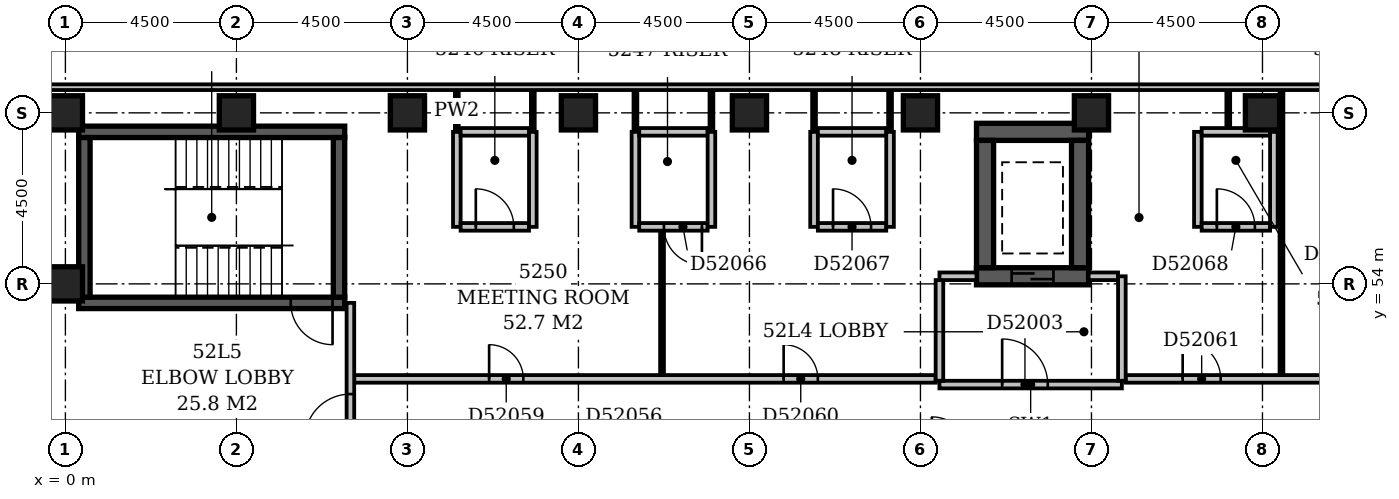
"""IFC4 building model, lengths in metres.
Left out: names, types, materials, properties, quantities, classifications, styles, units other than length and angle.
Written with IfcOpenShell. Run it as: python <this file> out.ifc"""

import sys

from ifc_helpers import new_model, si_unit, direction, frame, frame_2d, origin, origin_2d, place, context, subcontext, project, spatial, rectangle, extrude, element, fill, save


model = new_model("IFC4")
c1 = context("Model", 3, precision=1e-05, world=origin(), true_north=direction((0.0, 1.0)))
c2 = subcontext(c1, "Body", "Model", "MODEL_VIEW")
j1 = project(units=[si_unit("LENGTHUNIT", "METRE"), si_unit("PLANEANGLEUNIT", "RADIAN")], contexts=[c1])
p1 = place(None, origin())
s1 = spatial("IfcSite", under=j1, at=p1, CompositionType="ELEMENT")
p2 = place(p1, origin())
s2 = spatial("IfcBuilding", under=s1, at=p2, CompositionType="ELEMENT")
p3 = place(p2, frame((0.0, 0.0, 204.2)))
s3 = spatial("IfcBuildingStorey", under=s2, at=p3, CompositionType="ELEMENT", Elevation=204.2)
p4 = place(p3, frame((0.35, 53.5, -0.3), z_axis=(0.0, 0.0, 1.0), x_axis=(1.0, 0.0, 0.0)))
e1 = element("IfcWall", 1, at=p4, inside=s3, PredefinedType="SHEAR", context=c2, shape_type="SweptSolid", body=[
    extrude(rectangle(XDim=7.0, YDim=0.3, at=frame_2d((3.5, 0.0))), origin(), (0.0, 0.0, 1.0), 3.6),
])
p5 = place(p4, frame((5.58, 0.0, 0.3)))
e2 = element("IfcOpeningElement", 2, at=p5, cuts=e1, PredefinedType="OPENING", context=c2, shape_type="SweptSolid", body=[
    extrude(rectangle(XDim=1.1, YDim=2.1, at=frame_2d((0.55, 1.05))), frame((0.0, 0.162, 0.0), z_axis=(0.0, -1.0, 0.0), x_axis=(1.0, 0.0, 0.0)), (0.0, 0.0, 1.0), 0.324),
])
p6 = place(p3, frame((0.35, 58.0, -0.3), z_axis=(0.0, 0.0, 1.0), x_axis=(1.0, 0.0, 0.0)))
e3 = element("IfcWall", 3, at=p6, inside=s3, PredefinedType="SHEAR", context=c2, shape_type="SweptSolid", body=[
    extrude(rectangle(XDim=7.0, YDim=0.3, at=frame_2d((3.5, 0.0))), origin(), (0.0, 0.0, 1.0), 3.6),
])
for number, where, z_axis, x_axis in (
    (4, (0.5, 53.65, -0.3), (0.0, 0.0, 1.0), (0.0, 1.0, 0.0)),
    (5, (7.2, 53.65, -0.3), (0.0, 0.0, 1.0), (0.0, 1.0, 0.0)),
):
    element("IfcWall", number, at=place(p3, frame(where, z_axis=z_axis, x_axis=x_axis)), inside=s3, PredefinedType="SHEAR", context=c2, shape_type="SweptSolid", body=[
        extrude(rectangle(XDim=4.2, YDim=0.3, at=frame_2d((2.1, 0.0))), origin(), (0.0, 0.0, 1.0), 3.6),
    ])
p7 = place(p3, frame((23.975, 54.2, -0.3), z_axis=(0.0, 0.0, 1.0), x_axis=(1.0, 0.0, 0.0)))
e6 = element("IfcWall", 6, at=p7, inside=s3, PredefinedType="SHEAR", context=c2, shape_type="SweptSolid", body=[
    extrude(rectangle(XDim=2.95, YDim=0.45, at=frame_2d((1.475, 0.0))), origin(), (0.0, 0.0, 1.0), 3.6),
])
p8 = place(p7, frame((0.925, 0.0, 0.3)))
e7 = element("IfcOpeningElement", 7, at=p8, cuts=e6, PredefinedType="OPENING", context=c2, shape_type="SweptSolid", body=[
    extrude(rectangle(XDim=1.1, YDim=2.1, at=frame_2d((0.55, 1.05))), frame((0.0, 0.237, 0.0), z_axis=(0.0, -1.0, 0.0), x_axis=(1.0, 0.0, 0.0)), (0.0, 0.0, 1.0), 0.474),
])
p9 = place(p3, frame((23.975, 58.0, -0.3), z_axis=(0.0, 0.0, 1.0), x_axis=(1.0, 0.0, 0.0)))
e8 = element("IfcWall", 8, at=p9, inside=s3, PredefinedType="SHEAR", context=c2, shape_type="SweptSolid", body=[
    extrude(rectangle(XDim=2.95, YDim=0.45, at=frame_2d((1.475, 0.0))), origin(), (0.0, 0.0, 1.0), 3.6),
])
for number, where, z_axis, x_axis in (
    (9, (24.2, 54.425, -0.3), (0.0, 0.0, 1.0), (0.0, 1.0, 0.0)),
    (10, (26.7, 54.425, -0.3), (0.0, 0.0, 1.0), (0.0, 1.0, 0.0)),
):
    element("IfcWall", number, at=place(p3, frame(where, z_axis=z_axis, x_axis=x_axis)), inside=s3, PredefinedType="SHEAR", context=c2, shape_type="SweptSolid", body=[
        extrude(rectangle(XDim=3.35, YDim=0.45, at=frame_2d((1.675, 0.0))), origin(), (0.0, 0.0, 1.0), 3.6),
    ])
for number, where, z_axis, x_axis in (
    (11, (0.0, 54.0, -0.3), (0.0, 0.0, 1.0), (1.0, 0.0, 0.0)),
    (12, (0.0, 58.5, -0.3), (0.0, 0.0, 1.0), (1.0, 0.0, 0.0)),
    (13, (4.5, 58.5, -0.3), (0.0, 0.0, 1.0), (1.0, 0.0, 0.0)),
    (14, (9.0, 58.5, -0.3), (0.0, 0.0, 1.0), (1.0, 0.0, 0.0)),
    (15, (13.5, 58.5, -0.3), (0.0, 0.0, 1.0), (1.0, 0.0, 0.0)),
    (16, (18.0, 58.5, -0.3), (0.0, 0.0, 1.0), (1.0, 0.0, 0.0)),
    (17, (22.5, 58.5, -0.3), (0.0, 0.0, 1.0), (1.0, 0.0, 0.0)),
    (18, (27.0, 58.5, -0.3), (0.0, 0.0, 1.0), (1.0, 0.0, 0.0)),
    (19, (31.5, 58.5, -0.3), (0.0, 0.0, 1.0), (1.0, 0.0, 0.0)),
):
    element("IfcColumn", number, at=place(p3, frame(where, z_axis=z_axis, x_axis=x_axis)), inside=s3, PredefinedType="COLUMN", context=c2, shape_type="SweptSolid", body=[
        extrude(rectangle(XDim=0.9, YDim=0.9, at=origin_2d()), origin(), (0.0, 0.0, 1.0), 3.6),
    ])
p10 = place(p3, frame((50.1, 59.175, 0.0), z_axis=(0.0, 0.0, 1.0), x_axis=(-1.0, 0.0, 0.0)))
e20 = element("IfcWall", 20, at=p10, inside=s3, PredefinedType="STANDARD", context=c2, shape_type="SweptSolid", body=[
    extrude(rectangle(XDim=50.85, YDim=0.15, at=frame_2d((25.425, 0.0))), origin(), (0.0, 0.0, 1.0), 2.7),
])
p11 = place(p3, frame((23.0, 51.35, 0.0), z_axis=(0.0, 0.0, 1.0), x_axis=(1.0, 0.0, 0.0)))
e21 = element("IfcWall", 21, at=p11, inside=s3, PredefinedType="PARTITIONING", context=c2, shape_type="SweptSolid", body=[
    extrude(rectangle(XDim=4.8, YDim=0.2, at=frame_2d((2.4, 0.0))), origin(), (0.0, 0.0, 1.0), 3.3),
])
p12 = place(p11, frame((1.65, 0.0, 0.0)))
e22 = element("IfcOpeningElement", 22, at=p12, cuts=e21, PredefinedType="OPENING", context=c2, shape_type="SweptSolid", body=[
    extrude(rectangle(XDim=1.2, YDim=2.1, at=frame_2d((0.6, 1.05))), frame((0.0, 0.112, 0.0), z_axis=(0.0, -1.0, 0.0), x_axis=(1.0, 0.0, 0.0)), (0.0, 0.0, 1.0), 0.224),
])
p13 = place(p3, frame((27.8, 51.45, 0.0), z_axis=(0.0, 0.0, 1.0), x_axis=(0.0, 1.0, 0.0)))
e23 = element("IfcWall", 23, at=p13, inside=s3, PredefinedType="PARTITIONING", context=c2, shape_type="SweptSolid", body=[
    extrude(rectangle(XDim=2.75, YDim=0.2, at=frame_2d((1.375, 0.0))), origin(), (0.0, 0.0, 1.0), 3.3),
])
p14 = place(p3, frame((23.0, 54.2, 0.0), z_axis=(0.0, 0.0, 1.0), x_axis=(1.0, 0.0, 0.0)))
e24 = element("IfcWall", 24, at=p14, inside=s3, PredefinedType="PARTITIONING", context=c2, shape_type="SweptSolid", body=[
    extrude(rectangle(XDim=0.975, YDim=0.2, at=frame_2d((0.488, 0.0))), origin(), (0.0, 0.0, 1.0), 3.3),
])
p15 = place(p3, frame((26.925, 54.2, 0.0), z_axis=(0.0, 0.0, 1.0), x_axis=(1.0, 0.0, 0.0)))
e25 = element("IfcWall", 25, at=p15, inside=s3, PredefinedType="PARTITIONING", context=c2, shape_type="SweptSolid", body=[
    extrude(rectangle(XDim=0.775, YDim=0.2, at=frame_2d((0.387, 0.0))), origin(), (0.0, 0.0, 1.0), 3.3),
])
p16 = place(p3, frame((23.0, 51.45, 0.0), z_axis=(0.0, 0.0, 1.0), x_axis=(0.0, 1.0, 0.0)))
e26 = element("IfcWall", 26, at=p16, inside=s3, PredefinedType="PARTITIONING", context=c2, shape_type="SweptSolid", body=[
    extrude(rectangle(XDim=2.65, YDim=0.2, at=frame_2d((1.325, 0.0))), origin(), (0.0, 0.0, 1.0), 3.3),
])
p17 = place(p3, frame((7.5, 49.6, 0.0), z_axis=(0.0, 0.0, 1.0), x_axis=(0.0, 1.0, 0.0)))
e27 = element("IfcWall", 27, at=p17, inside=s3, PredefinedType="PARTITIONING", context=c2, shape_type="SweptSolid", body=[
    extrude(rectangle(XDim=3.9, YDim=0.2, at=frame_2d((1.95, 0.0))), origin(), (0.0, 0.0, 1.0), 3.3),
])
p18 = place(p17, frame((0.3, 0.0, 0.0)))
e28 = element("IfcOpeningElement", 28, at=p18, cuts=e27, PredefinedType="OPENING", context=c2, shape_type="SweptSolid", body=[
    extrude(rectangle(XDim=1.2, YDim=2.1, at=frame_2d((0.6, 1.05))), frame((0.0, 0.112, 0.0), z_axis=(0.0, -1.0, 0.0), x_axis=(1.0, 0.0, 0.0)), (0.0, 0.0, 1.0), 0.224),
])
p19 = place(p3, frame((7.6, 51.5, 0.0), z_axis=(0.0, 0.0, 1.0), x_axis=(1.0, 0.0, 0.0)))
e29 = element("IfcWall", 29, at=p19, inside=s3, PredefinedType="PARTITIONING", context=c2, shape_type="SweptSolid", body=[
    extrude(rectangle(XDim=15.3, YDim=0.2, at=frame_2d((7.65, 0.0))), origin(), (0.0, 0.0, 1.0), 3.3),
])
p20 = place(p19, frame((3.55, 0.0, 0.0)))
e30 = element("IfcOpeningElement", 30, at=p20, cuts=e29, PredefinedType="OPENING", context=c2, shape_type="SweptSolid", body=[
    extrude(rectangle(XDim=0.9, YDim=2.1, at=frame_2d((0.45, 1.05))), frame((0.0, 0.112, 0.0), z_axis=(0.0, -1.0, 0.0), x_axis=(1.0, 0.0, 0.0)), (0.0, 0.0, 1.0), 0.224),
])
p21 = place(p19, frame((11.3, 0.0, 0.0)))
e31 = element("IfcOpeningElement", 31, at=p21, cuts=e29, PredefinedType="OPENING", context=c2, shape_type="SweptSolid", body=[
    extrude(rectangle(XDim=0.9, YDim=2.1, at=frame_2d((0.45, 1.05))), frame((0.0, 0.112, 0.0), z_axis=(0.0, -1.0, 0.0), x_axis=(1.0, 0.0, 0.0)), (0.0, 0.0, 1.0), 0.224),
])
p22 = place(p3, frame((27.9, 51.5, 0.0), z_axis=(0.0, 0.0, 1.0), x_axis=(1.0, 0.0, 0.0)))
e32 = element("IfcWall", 32, at=p22, inside=s3, PredefinedType="PARTITIONING", context=c2, shape_type="SweptSolid", body=[
    extrude(rectangle(XDim=9.3, YDim=0.2, at=frame_2d((4.65, 0.0))), origin(), (0.0, 0.0, 1.0), 3.3),
])
p23 = place(p22, frame((1.5, 0.0, 0.0)))
e33 = element("IfcOpeningElement", 33, at=p23, cuts=e32, PredefinedType="OPENING", context=c2, shape_type="SweptSolid", body=[
    extrude(rectangle(XDim=1.0, YDim=2.1, at=frame_2d((0.5, 1.05))), frame((0.0, 0.112, 0.0), z_axis=(0.0, -1.0, 0.0), x_axis=(1.0, 0.0, 0.0)), (0.0, 0.0, 1.0), 0.224),
])
p24 = place(p22, frame((6.3, 0.0, 0.0)))
e34 = element("IfcOpeningElement", 34, at=p24, cuts=e32, PredefinedType="OPENING", context=c2, shape_type="SweptSolid", body=[
    extrude(rectangle(XDim=0.9, YDim=2.1, at=frame_2d((0.45, 1.05))), frame((0.0, 0.112, 0.0), z_axis=(0.0, -1.0, 0.0), x_axis=(1.0, 0.0, 0.0)), (0.0, 0.0, 1.0), 0.224),
])
p25 = place(p3, frame((15.7, 51.6, 0.0), z_axis=(0.0, 0.0, 1.0), x_axis=(0.0, 1.0, 0.0)))
e35 = element("IfcWall", 35, at=p25, inside=s3, PredefinedType="PARTITIONING", context=c2, shape_type="SweptSolid", body=[
    extrude(rectangle(XDim=3.8, YDim=0.1, at=frame_2d((1.9, 0.0))), origin(), (0.0, 0.0, 1.0), 3.3),
])
p26 = place(p3, frame((32.0, 51.6, 0.0), z_axis=(0.0, 0.0, 1.0), x_axis=(0.0, 1.0, 0.0)))
e36 = element("IfcWall", 36, at=p26, inside=s3, PredefinedType="PARTITIONING", context=c2, shape_type="SweptSolid", body=[
    extrude(rectangle(XDim=7.5, YDim=0.1, at=frame_2d((3.75, 0.0))), origin(), (0.0, 0.0, 1.0), 3.3),
])
p27 = place(p3, frame((10.3, 55.5, 0.0), z_axis=(0.0, 0.0, 1.0), x_axis=(0.0, 1.0, 0.0)))
e37 = element("IfcWall", 37, at=p27, inside=s3, PredefinedType="PARTITIONING", context=c2, shape_type="SweptSolid", body=[
    extrude(rectangle(XDim=2.5, YDim=0.2, at=frame_2d((1.25, 0.0))), origin(), (0.0, 0.0, 1.0), 3.3),
])
p28 = place(p3, frame((10.4, 55.5, 0.0), z_axis=(0.0, 0.0, 1.0), x_axis=(1.0, 0.0, 0.0)))
e38 = element("IfcWall", 38, at=p28, inside=s3, PredefinedType="PARTITIONING", context=c2, shape_type="SweptSolid", body=[
    extrude(rectangle(XDim=1.8, YDim=0.2, at=frame_2d((0.9, 0.0))), origin(), (0.0, 0.0, 1.0), 3.3),
])
p29 = place(p28, frame((0.4, 0.0, 0.0)))
e39 = element("IfcOpeningElement", 39, at=p29, cuts=e38, PredefinedType="OPENING", context=c2, shape_type="SweptSolid", body=[
    extrude(rectangle(XDim=1.0, YDim=2.1, at=frame_2d((0.5, 1.05))), frame((0.0, 0.112, 0.0), z_axis=(0.0, -1.0, 0.0), x_axis=(1.0, 0.0, 0.0)), (0.0, 0.0, 1.0), 0.224),
])
for number, where, z_axis, x_axis in (
    (40, (12.3, 55.5, 0.0), (0.0, 0.0, 1.0), (0.0, 1.0, 0.0)),
    (41, (15.0, 55.5, 0.0), (0.0, 0.0, 1.0), (0.0, 1.0, 0.0)),
):
    element("IfcWall", number, at=place(p3, frame(where, z_axis=z_axis, x_axis=x_axis)), inside=s3, PredefinedType="PARTITIONING", context=c2, shape_type="SweptSolid", body=[
        extrude(rectangle(XDim=2.5, YDim=0.2, at=frame_2d((1.25, 0.0))), origin(), (0.0, 0.0, 1.0), 3.3),
    ])
p30 = place(p3, frame((15.1, 55.5, 0.0), z_axis=(0.0, 0.0, 1.0), x_axis=(1.0, 0.0, 0.0)))
e42 = element("IfcWall", 42, at=p30, inside=s3, PredefinedType="PARTITIONING", context=c2, shape_type="SweptSolid", body=[
    extrude(rectangle(XDim=1.8, YDim=0.2, at=frame_2d((0.9, 0.0))), origin(), (0.0, 0.0, 1.0), 3.3),
])
p31 = place(p30, frame((0.65, 0.0, 0.0)))
e43 = element("IfcOpeningElement", 43, at=p31, cuts=e42, PredefinedType="OPENING", context=c2, shape_type="SweptSolid", body=[
    extrude(rectangle(XDim=1.0, YDim=2.1, at=frame_2d((0.5, 1.05))), frame((0.0, 0.112, 0.0), z_axis=(0.0, -1.0, 0.0), x_axis=(1.0, 0.0, 0.0)), (0.0, 0.0, 1.0), 0.224),
])
for number, where, z_axis, x_axis in (
    (44, (17.0, 55.5, 0.0), (0.0, 0.0, 1.0), (0.0, 1.0, 0.0)),
    (45, (19.7, 55.5, 0.0), (0.0, 0.0, 1.0), (0.0, 1.0, 0.0)),
):
    element("IfcWall", number, at=place(p3, frame(where, z_axis=z_axis, x_axis=x_axis)), inside=s3, PredefinedType="PARTITIONING", context=c2, shape_type="SweptSolid", body=[
        extrude(rectangle(XDim=2.5, YDim=0.2, at=frame_2d((1.25, 0.0))), origin(), (0.0, 0.0, 1.0), 3.3),
    ])
p32 = place(p3, frame((19.8, 55.5, 0.0), z_axis=(0.0, 0.0, 1.0), x_axis=(1.0, 0.0, 0.0)))
e46 = element("IfcWall", 46, at=p32, inside=s3, PredefinedType="PARTITIONING", context=c2, shape_type="SweptSolid", body=[
    extrude(rectangle(XDim=1.8, YDim=0.2, at=frame_2d((0.9, 0.0))), origin(), (0.0, 0.0, 1.0), 3.3),
])
p33 = place(p32, frame((0.4, 0.0, 0.0)))
e47 = element("IfcOpeningElement", 47, at=p33, cuts=e46, PredefinedType="OPENING", context=c2, shape_type="SweptSolid", body=[
    extrude(rectangle(XDim=1.0, YDim=2.1, at=frame_2d((0.5, 1.05))), frame((0.0, 0.112, 0.0), z_axis=(0.0, -1.0, 0.0), x_axis=(1.0, 0.0, 0.0)), (0.0, 0.0, 1.0), 0.224),
])
for number, where, z_axis, x_axis in (
    (48, (21.7, 55.5, 0.0), (0.0, 0.0, 1.0), (0.0, 1.0, 0.0)),
    (49, (29.8, 55.5, 0.0), (0.0, 0.0, 1.0), (0.0, 1.0, 0.0)),
):
    element("IfcWall", number, at=place(p3, frame(where, z_axis=z_axis, x_axis=x_axis)), inside=s3, PredefinedType="PARTITIONING", context=c2, shape_type="SweptSolid", body=[
        extrude(rectangle(XDim=2.5, YDim=0.2, at=frame_2d((1.25, 0.0))), origin(), (0.0, 0.0, 1.0), 3.3),
    ])
p34 = place(p3, frame((29.9, 55.5, 0.0), z_axis=(0.0, 0.0, 1.0), x_axis=(1.0, 0.0, 0.0)))
e50 = element("IfcWall", 50, at=p34, inside=s3, PredefinedType="PARTITIONING", context=c2, shape_type="SweptSolid", body=[
    extrude(rectangle(XDim=1.8, YDim=0.2, at=frame_2d((0.9, 0.0))), origin(), (0.0, 0.0, 1.0), 3.3),
])
p35 = place(p34, frame((0.4, 0.0, 0.0)))
e51 = element("IfcOpeningElement", 51, at=p35, cuts=e50, PredefinedType="OPENING", context=c2, shape_type="SweptSolid", body=[
    extrude(rectangle(XDim=1.0, YDim=2.1, at=frame_2d((0.5, 1.05))), frame((0.0, 0.112, 0.0), z_axis=(0.0, -1.0, 0.0), x_axis=(1.0, 0.0, 0.0)), (0.0, 0.0, 1.0), 0.224),
])
p36 = place(p3, frame((31.8, 55.5, 0.0), z_axis=(0.0, 0.0, 1.0), x_axis=(0.0, 1.0, 0.0)))
e52 = element("IfcWall", 52, at=p36, inside=s3, PredefinedType="PARTITIONING", context=c2, shape_type="SweptSolid", body=[
    extrude(rectangle(XDim=2.5, YDim=0.2, at=frame_2d((1.25, 0.0))), origin(), (0.0, 0.0, 1.0), 3.3),
])
p37 = place(p3, frame((10.3, 58.0, 0.0), z_axis=(0.0, 0.0, 1.0), x_axis=(0.0, 1.0, 0.0)))
e53 = element("IfcWall", 53, at=p37, inside=s3, PredefinedType="PARTITIONING", context=c2, shape_type="SweptSolid", body=[
    extrude(rectangle(XDim=1.1, YDim=0.1, at=frame_2d((0.55, 0.0))), origin(), (0.0, 0.0, 1.0), 3.3),
])
p38 = place(p3, frame((10.4, 58.0, 0.0), z_axis=(0.0, 0.0, 1.0), x_axis=(1.0, 0.0, 0.0)))
e54 = element("IfcWall", 54, at=p38, inside=s3, PredefinedType="PARTITIONING", context=c2, shape_type="SweptSolid", body=[
    extrude(rectangle(XDim=1.8, YDim=0.2, at=frame_2d((0.9, 0.0))), origin(), (0.0, 0.0, 1.0), 3.3),
])
for number, where, z_axis, x_axis in (
    (55, (12.3, 58.0, 0.0), (0.0, 0.0, 1.0), (0.0, 1.0, 0.0)),
    (56, (15.0, 58.0, 0.0), (0.0, 0.0, 1.0), (0.0, 1.0, 0.0)),
):
    element("IfcWall", number, at=place(p3, frame(where, z_axis=z_axis, x_axis=x_axis)), inside=s3, PredefinedType="PARTITIONING", context=c2, shape_type="SweptSolid", body=[
        extrude(rectangle(XDim=1.1, YDim=0.1, at=frame_2d((0.55, 0.0))), origin(), (0.0, 0.0, 1.0), 3.3),
    ])
p39 = place(p3, frame((15.1, 58.0, 0.0), z_axis=(0.0, 0.0, 1.0), x_axis=(1.0, 0.0, 0.0)))
e57 = element("IfcWall", 57, at=p39, inside=s3, PredefinedType="PARTITIONING", context=c2, shape_type="SweptSolid", body=[
    extrude(rectangle(XDim=1.8, YDim=0.2, at=frame_2d((0.9, 0.0))), origin(), (0.0, 0.0, 1.0), 3.3),
])
for number, where, z_axis, x_axis in (
    (58, (17.0, 58.0, 0.0), (0.0, 0.0, 1.0), (0.0, 1.0, 0.0)),
    (59, (19.7, 58.0, 0.0), (0.0, 0.0, 1.0), (0.0, 1.0, 0.0)),
):
    element("IfcWall", number, at=place(p3, frame(where, z_axis=z_axis, x_axis=x_axis)), inside=s3, PredefinedType="PARTITIONING", context=c2, shape_type="SweptSolid", body=[
        extrude(rectangle(XDim=1.1, YDim=0.1, at=frame_2d((0.55, 0.0))), origin(), (0.0, 0.0, 1.0), 3.3),
    ])
p40 = place(p3, frame((19.8, 58.0, 0.0), z_axis=(0.0, 0.0, 1.0), x_axis=(1.0, 0.0, 0.0)))
e60 = element("IfcWall", 60, at=p40, inside=s3, PredefinedType="PARTITIONING", context=c2, shape_type="SweptSolid", body=[
    extrude(rectangle(XDim=1.8, YDim=0.2, at=frame_2d((0.9, 0.0))), origin(), (0.0, 0.0, 1.0), 3.3),
])
p41 = place(p3, frame((21.7, 58.0, 0.0), z_axis=(0.0, 0.0, 1.0), x_axis=(0.0, 1.0, 0.0)))
e61 = element("IfcWall", 61, at=p41, inside=s3, PredefinedType="PARTITIONING", context=c2, shape_type="SweptSolid", body=[
    extrude(rectangle(XDim=1.1, YDim=0.1, at=frame_2d((0.55, 0.0))), origin(), (0.0, 0.0, 1.0), 3.3),
])
p42 = place(p3, frame((29.9, 58.0, 0.0), z_axis=(0.0, 0.0, 1.0), x_axis=(1.0, 0.0, 0.0)))
e62 = element("IfcWall", 62, at=p42, inside=s3, PredefinedType="PARTITIONING", context=c2, shape_type="SweptSolid", body=[
    extrude(rectangle(XDim=1.8, YDim=0.2, at=frame_2d((0.9, 0.0))), origin(), (0.0, 0.0, 1.0), 3.3),
])
p43 = place(p3, frame((30.6, 58.1, 0.0), z_axis=(0.0, 0.0, 1.0), x_axis=(0.0, 1.0, 0.0)))
e63 = element("IfcWall", 63, at=p43, inside=s3, PredefinedType="PARTITIONING", context=c2, shape_type="SweptSolid", body=[
    extrude(rectangle(XDim=1.0, YDim=0.1, at=frame_2d((0.5, 0.0))), origin(), (0.0, 0.0, 1.0), 3.3),
])
p44 = place(p18, origin())
e64 = element("IfcDoor", 64, at=p44, inside=s3, OperationType="SINGLE_SWING_LEFT", PredefinedType="DOOR", context=c2, shape_type="SweptSolid", body=[
    extrude(rectangle(XDim=1.2, YDim=2.1, at=frame_2d((0.6, 1.05))), frame((0.0, 0.025, 0.0), z_axis=(0.0, -1.0, 0.0), x_axis=(1.0, 0.0, 0.0)), (0.0, 0.0, 1.0), 0.05),
])
fill(e28, e64)
p45 = place(p12, origin())
e65 = element("IfcDoor", 65, at=p45, inside=s3, OperationType="SINGLE_SWING_LEFT", PredefinedType="DOOR", context=c2, shape_type="SweptSolid", body=[
    extrude(rectangle(XDim=1.2, YDim=2.1, at=frame_2d((0.6, 1.05))), frame((0.0, 0.025, 0.0), z_axis=(0.0, -1.0, 0.0), x_axis=(1.0, 0.0, 0.0)), (0.0, 0.0, 1.0), 0.05),
])
fill(e22, e65)
p46 = place(p8, origin())
e66 = element("IfcDoor", 66, at=p46, inside=s3, OperationType="SLIDING_TO_LEFT", PredefinedType="DOOR", context=c2, shape_type="SweptSolid", body=[
    extrude(rectangle(XDim=1.1, YDim=2.1, at=frame_2d((0.55, 1.05))), frame((0.0, 0.025, 0.0), z_axis=(0.0, -1.0, 0.0), x_axis=(1.0, 0.0, 0.0)), (0.0, 0.0, 1.0), 0.05),
])
fill(e7, e66)
p47 = place(p5, origin())
e67 = element("IfcDoor", 67, at=p47, inside=s3, OperationType="SINGLE_SWING_RIGHT", PredefinedType="DOOR", context=c2, shape_type="SweptSolid", body=[
    extrude(rectangle(XDim=1.1, YDim=2.1, at=frame_2d((0.55, 1.05))), frame((0.0, 0.025, 0.0), z_axis=(0.0, -1.0, 0.0), x_axis=(1.0, 0.0, 0.0)), (0.0, 0.0, 1.0), 0.05),
])
fill(e2, e67)
p48 = place(p20, origin())
e68 = element("IfcDoor", 68, at=p48, inside=s3, OperationType="SINGLE_SWING_LEFT", PredefinedType="DOOR", context=c2, shape_type="SweptSolid", body=[
    extrude(rectangle(XDim=0.9, YDim=2.1, at=frame_2d((0.45, 1.05))), frame((0.0, 0.025, 0.0), z_axis=(0.0, -1.0, 0.0), x_axis=(1.0, 0.0, 0.0)), (0.0, 0.0, 1.0), 0.05),
])
fill(e30, e68)
p49 = place(p21, origin())
e69 = element("IfcDoor", 69, at=p49, inside=s3, OperationType="SINGLE_SWING_LEFT", PredefinedType="DOOR", context=c2, shape_type="SweptSolid", body=[
    extrude(rectangle(XDim=0.9, YDim=2.1, at=frame_2d((0.45, 1.05))), frame((0.0, 0.025, 0.0), z_axis=(0.0, -1.0, 0.0), x_axis=(1.0, 0.0, 0.0)), (0.0, 0.0, 1.0), 0.05),
])
fill(e31, e69)
p50 = place(p23, origin())
e70 = element("IfcDoor", 70, at=p50, inside=s3, OperationType="SINGLE_SWING_LEFT", PredefinedType="DOOR", context=c2, shape_type="SweptSolid", body=[
    extrude(rectangle(XDim=1.0, YDim=2.1, at=frame_2d((0.5, 1.05))), frame((0.0, 0.025, 0.0), z_axis=(0.0, -1.0, 0.0), x_axis=(1.0, 0.0, 0.0)), (0.0, 0.0, 1.0), 0.05),
])
fill(e33, e70)
p51 = place(p29, origin())
e71 = element("IfcDoor", 71, at=p51, inside=s3, OperationType="SINGLE_SWING_LEFT", PredefinedType="DOOR", context=c2, shape_type="SweptSolid", body=[
    extrude(rectangle(XDim=1.0, YDim=2.1, at=frame_2d((0.5, 1.05))), frame((0.0, 0.025, 0.0), z_axis=(0.0, -1.0, 0.0), x_axis=(1.0, 0.0, 0.0)), (0.0, 0.0, 1.0), 0.05),
])
fill(e39, e71)
p52 = place(p31, origin())
e72 = element("IfcDoor", 72, at=p52, inside=s3, OperationType="SINGLE_SWING_RIGHT", PredefinedType="DOOR", context=c2, shape_type="SweptSolid", body=[
    extrude(rectangle(XDim=1.0, YDim=2.1, at=frame_2d((0.5, 1.05))), frame((0.0, 0.025, 0.0), z_axis=(0.0, -1.0, 0.0), x_axis=(1.0, 0.0, 0.0)), (0.0, 0.0, 1.0), 0.05),
])
fill(e43, e72)
p53 = place(p33, origin())
e73 = element("IfcDoor", 73, at=p53, inside=s3, OperationType="SINGLE_SWING_LEFT", PredefinedType="DOOR", context=c2, shape_type="SweptSolid", body=[
    extrude(rectangle(XDim=1.0, YDim=2.1, at=frame_2d((0.5, 1.05))), frame((0.0, 0.025, 0.0), z_axis=(0.0, -1.0, 0.0), x_axis=(1.0, 0.0, 0.0)), (0.0, 0.0, 1.0), 0.05),
])
fill(e47, e73)
p54 = place(p35, origin())
e74 = element("IfcDoor", 74, at=p54, inside=s3, OperationType="SINGLE_SWING_LEFT", PredefinedType="DOOR", context=c2, shape_type="SweptSolid", body=[
    extrude(rectangle(XDim=1.0, YDim=2.1, at=frame_2d((0.5, 1.05))), frame((0.0, 0.025, 0.0), z_axis=(0.0, -1.0, 0.0), x_axis=(1.0, 0.0, 0.0)), (0.0, 0.0, 1.0), 0.05),
])
fill(e51, e74)
save(model, sys.argv[1])
